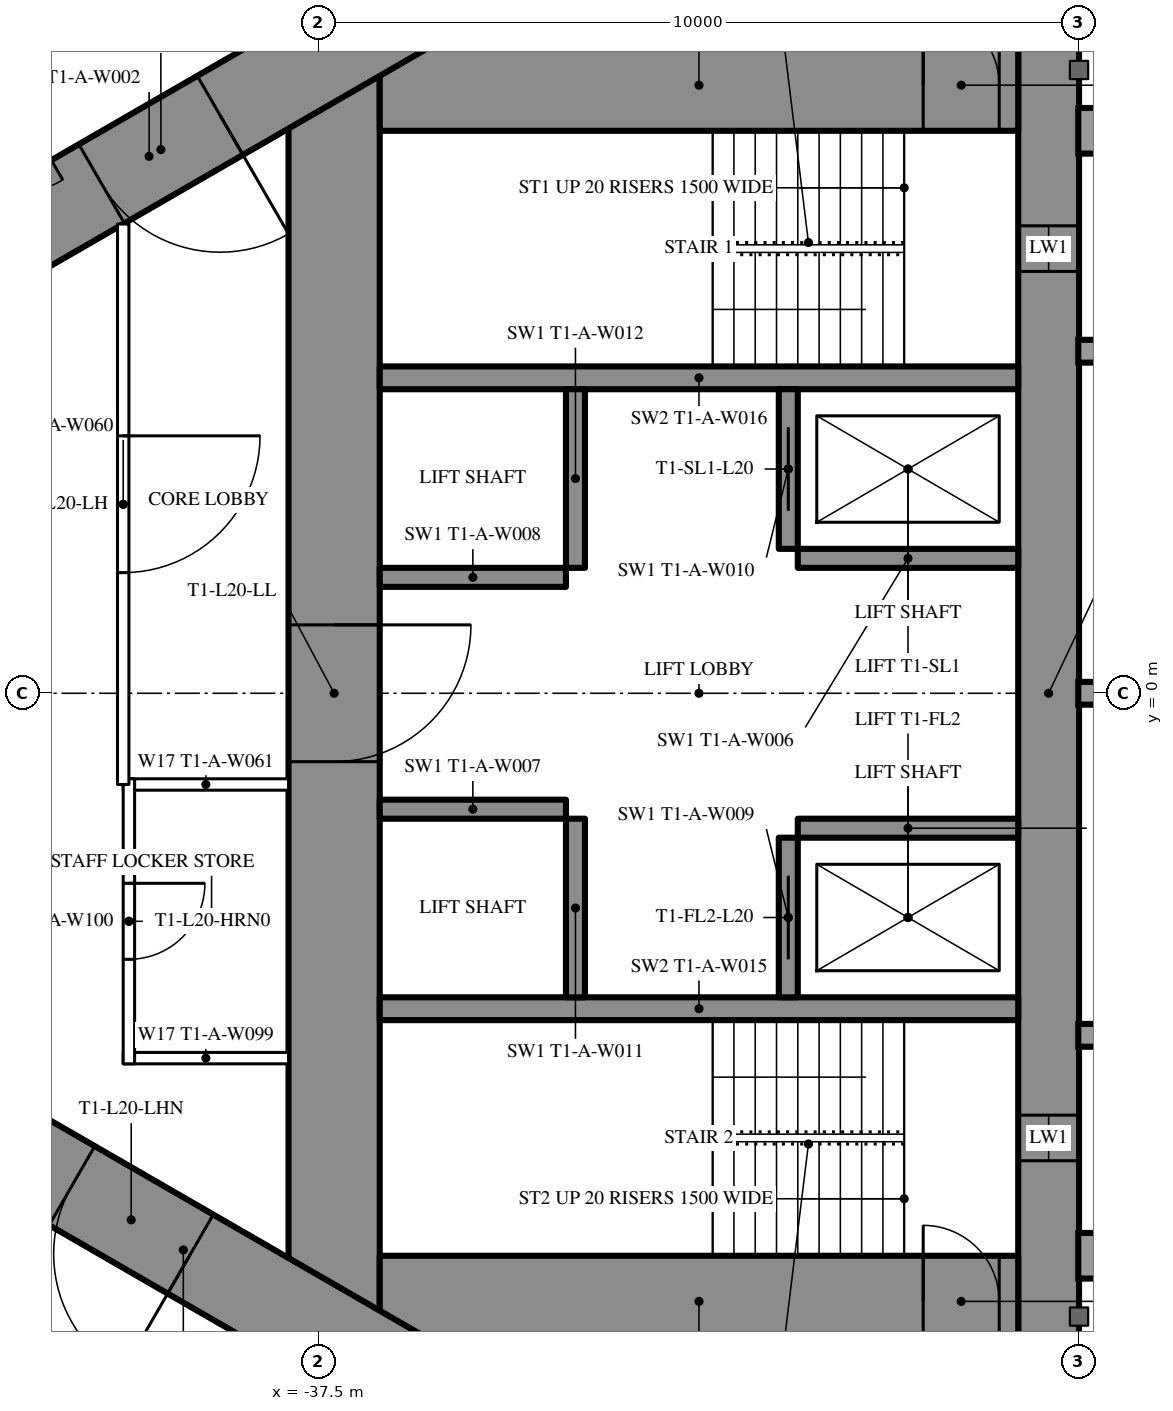
"""IFC4 building model, lengths in metres.
Left out: names, types, materials, properties, quantities, classifications, styles, units other than length and angle.
Written with IfcOpenShell. Run it as: python <this file> out.ifc"""

import sys

from ifc_helpers import new_model, si_unit, direction, frame, frame_2d, origin, place, context, subcontext, project, spatial, rectangle, extrude, element, fill, save


model = new_model("IFC4")
c1 = context("Model", 3, precision=1e-05, world=origin(), true_north=direction((0.0, 1.0)))
c2 = subcontext(c1, "Body", "Model", "MODEL_VIEW")
j1 = project(units=[si_unit("LENGTHUNIT", "METRE"), si_unit("PLANEANGLEUNIT", "RADIAN")], contexts=[c1])
p1 = place(None, origin())
s1 = spatial("IfcSite", under=j1, at=p1, CompositionType="ELEMENT")
p2 = place(p1, origin())
s2 = spatial("IfcBuilding", under=s1, at=p2, CompositionType="ELEMENT")
p3 = place(p2, frame((0.0, 0.0, 77.5)))
s3 = spatial("IfcBuildingStorey", under=s2, at=p3, CompositionType="ELEMENT", Elevation=77.5)
p4 = place(p3, frame((-27.9, 8.6, 0.0), z_axis=(0.0, 0.0, 1.0), x_axis=(0.0, -1.0, 0.0)))
e1 = element("IfcWall", 1, at=p4, inside=s3, PredefinedType="SHEAR", context=c2, shape_type="SweptSolid", body=[
    extrude(rectangle(XDim=17.2, YDim=0.8, at=frame_2d((8.6, 0.0))), origin(), (0.0, 0.0, 1.0), 3.5),
])
p5 = place(p4, frame((2.45, 0.0, 0.6)))
e2 = element("IfcOpeningElement", 2, at=p5, cuts=e1, PredefinedType="OPENING", context=c2, shape_type="SweptSolid", body=[
    extrude(rectangle(XDim=0.6, YDim=2.1, at=frame_2d((0.3, 1.05))), frame((0.0, 0.41, 0.0), z_axis=(0.0, -1.0, 0.0), x_axis=(1.0, 0.0, 0.0)), (0.0, 0.0, 1.0), 0.82),
])
p6 = place(p4, frame((14.15, 0.0, 0.6)))
e3 = element("IfcOpeningElement", 3, at=p6, cuts=e1, PredefinedType="OPENING", context=c2, shape_type="SweptSolid", body=[
    extrude(rectangle(XDim=0.6, YDim=2.1, at=frame_2d((0.3, 1.05))), frame((0.0, 0.41, 0.0), z_axis=(0.0, -1.0, 0.0), x_axis=(1.0, 0.0, 0.0)), (0.0, 0.0, 1.0), 0.82),
])
p7 = place(p3, frame((-37.3, 8.6, 0.0), z_axis=(0.0, 0.0, 1.0), x_axis=(0.0, -1.0, 0.0)))
e4 = element("IfcWall", 4, at=p7, inside=s3, PredefinedType="SHEAR", context=c2, shape_type="SweptSolid", body=[
    extrude(rectangle(XDim=17.2, YDim=1.2, at=frame_2d((8.6, 0.0))), origin(), (0.0, 0.0, 1.0), 3.5),
])
p8 = place(p7, frame((7.7, 0.0, 0.0)))
e5 = element("IfcOpeningElement", 5, at=p8, cuts=e4, PredefinedType="OPENING", context=c2, shape_type="SweptSolid", body=[
    extrude(rectangle(XDim=1.8, YDim=2.2, at=frame_2d((0.9, 1.1))), frame((0.0, 0.61, 0.0), z_axis=(0.0, -1.0, 0.0), x_axis=(1.0, 0.0, 0.0)), (0.0, 0.0, 1.0), 1.22),
])
p9 = place(p3, frame((-28.3, 8.0, 0.0), z_axis=(0.0, 0.0, 1.0), x_axis=(-1.0, 0.0, 0.0)))
e6 = element("IfcWall", 6, at=p9, inside=s3, PredefinedType="SHEAR", context=c2, shape_type="SweptSolid", body=[
    extrude(rectangle(XDim=8.4, YDim=1.2, at=frame_2d((4.2, 0.0))), origin(), (0.0, 0.0, 1.0), 3.5),
])
p10 = place(p9, frame((0.25, 0.0, 0.0)))
e7 = element("IfcOpeningElement", 7, at=p10, cuts=e6, PredefinedType="OPENING", context=c2, shape_type="SweptSolid", body=[
    extrude(rectangle(XDim=1.0, YDim=2.2, at=frame_2d((0.5, 1.1))), frame((0.0, 0.61, 0.0), z_axis=(0.0, -1.0, 0.0), x_axis=(1.0, 0.0, 0.0)), (0.0, 0.0, 1.0), 1.22),
])
p11 = place(p3, frame((-28.3, -8.0, 0.0), z_axis=(0.0, 0.0, 1.0), x_axis=(-1.0, 0.0, 0.0)))
e8 = element("IfcWall", 8, at=p11, inside=s3, PredefinedType="SHEAR", context=c2, shape_type="SweptSolid", body=[
    extrude(rectangle(XDim=8.4, YDim=1.2, at=frame_2d((4.2, 0.0))), origin(), (0.0, 0.0, 1.0), 3.5),
])
p12 = place(p11, frame((0.25, 0.0, 0.0)))
e9 = element("IfcOpeningElement", 9, at=p12, cuts=e8, PredefinedType="OPENING", context=c2, shape_type="SweptSolid", body=[
    extrude(rectangle(XDim=1.0, YDim=2.2, at=frame_2d((0.5, 1.1))), frame((0.0, 0.61, 0.0), z_axis=(0.0, -1.0, 0.0), x_axis=(1.0, 0.0, 0.0)), (0.0, 0.0, 1.0), 1.22),
])
for number, where, z_axis, x_axis in (
    (10, (-28.3, 4.15, 0.0), (0.0, 0.0, 1.0), (-1.0, 0.0, 0.0)),
    (11, (-28.3, -4.15, 0.0), (0.0, 0.0, 1.0), (-1.0, 0.0, 0.0)),
):
    element("IfcWall", number, at=place(p3, frame(where, z_axis=z_axis, x_axis=x_axis)), inside=s3, PredefinedType="SHEAR", context=c2, shape_type="SweptSolid", body=[
        extrude(rectangle(XDim=8.4, YDim=0.3, at=frame_2d((4.2, 0.0))), origin(), (0.0, 0.0, 1.0), 3.5),
    ])
p13 = place(p3, frame((-31.325, 4.0, 0.0), z_axis=(0.0, 0.0, 1.0), x_axis=(0.0, -1.0, 0.0)))
e12 = element("IfcWall", 12, at=p13, inside=s3, PredefinedType="SHEAR", context=c2, shape_type="SweptSolid", body=[
    extrude(rectangle(XDim=2.1, YDim=0.25, at=frame_2d((1.05, 0.0))), origin(), (0.0, 0.0, 1.0), 3.5),
])
p14 = place(p13, frame((0.5, 0.0, 0.0)))
e13 = element("IfcOpeningElement", 13, at=p14, cuts=e12, PredefinedType="OPENING", context=c2, shape_type="SweptSolid", body=[
    extrude(rectangle(XDim=1.1, YDim=2.2, at=frame_2d((0.55, 1.1))), frame((0.0, 0.135, 0.0), z_axis=(0.0, -1.0, 0.0), x_axis=(1.0, 0.0, 0.0)), (0.0, 0.0, 1.0), 0.27),
])
p15 = place(p3, frame((-34.125, 4.0, 0.0), z_axis=(0.0, 0.0, 1.0), x_axis=(0.0, -1.0, 0.0)))
e14 = element("IfcWall", 14, at=p15, inside=s3, PredefinedType="SHEAR", context=c2, shape_type="SweptSolid", body=[
    extrude(rectangle(XDim=2.35, YDim=0.25, at=frame_2d((1.175, 0.0))), origin(), (0.0, 0.0, 1.0), 3.5),
])
p16 = place(p3, frame((-28.3, 1.775, 0.0), z_axis=(0.0, 0.0, 1.0), x_axis=(-1.0, 0.0, 0.0)))
e15 = element("IfcWall", 15, at=p16, inside=s3, PredefinedType="SHEAR", context=c2, shape_type="SweptSolid", body=[
    extrude(rectangle(XDim=2.9, YDim=0.25, at=frame_2d((1.45, 0.0))), origin(), (0.0, 0.0, 1.0), 3.5),
])
p17 = place(p3, frame((-34.25, 1.525, 0.0), z_axis=(0.0, 0.0, 1.0), x_axis=(-1.0, 0.0, 0.0)))
e16 = element("IfcWall", 16, at=p17, inside=s3, PredefinedType="SHEAR", context=c2, shape_type="SweptSolid", body=[
    extrude(rectangle(XDim=2.45, YDim=0.25, at=frame_2d((1.225, 0.0))), origin(), (0.0, 0.0, 1.0), 3.5),
])
p18 = place(p3, frame((-31.325, -1.9, 0.0), z_axis=(0.0, 0.0, 1.0), x_axis=(0.0, -1.0, 0.0)))
e17 = element("IfcWall", 17, at=p18, inside=s3, PredefinedType="SHEAR", context=c2, shape_type="SweptSolid", body=[
    extrude(rectangle(XDim=2.1, YDim=0.25, at=frame_2d((1.05, 0.0))), origin(), (0.0, 0.0, 1.0), 3.5),
])
p19 = place(p18, frame((0.5, 0.0, 0.0)))
e18 = element("IfcOpeningElement", 18, at=p19, cuts=e17, PredefinedType="OPENING", context=c2, shape_type="SweptSolid", body=[
    extrude(rectangle(XDim=1.1, YDim=2.2, at=frame_2d((0.55, 1.1))), frame((0.0, 0.135, 0.0), z_axis=(0.0, -1.0, 0.0), x_axis=(1.0, 0.0, 0.0)), (0.0, 0.0, 1.0), 0.27),
])
p20 = place(p3, frame((-34.125, -1.65, 0.0), z_axis=(0.0, 0.0, 1.0), x_axis=(0.0, -1.0, 0.0)))
e19 = element("IfcWall", 19, at=p20, inside=s3, PredefinedType="SHEAR", context=c2, shape_type="SweptSolid", body=[
    extrude(rectangle(XDim=2.35, YDim=0.25, at=frame_2d((1.175, 0.0))), origin(), (0.0, 0.0, 1.0), 3.5),
])
p21 = place(p3, frame((-28.3, -1.775, 0.0), z_axis=(0.0, 0.0, 1.0), x_axis=(-1.0, 0.0, 0.0)))
e20 = element("IfcWall", 20, at=p21, inside=s3, PredefinedType="SHEAR", context=c2, shape_type="SweptSolid", body=[
    extrude(rectangle(XDim=2.9, YDim=0.25, at=frame_2d((1.45, 0.0))), origin(), (0.0, 0.0, 1.0), 3.5),
])
p22 = place(p3, frame((-34.25, -1.525, 0.0), z_axis=(0.0, 0.0, 1.0), x_axis=(-1.0, 0.0, 0.0)))
e21 = element("IfcWall", 21, at=p22, inside=s3, PredefinedType="SHEAR", context=c2, shape_type="SweptSolid", body=[
    extrude(rectangle(XDim=2.45, YDim=0.25, at=frame_2d((1.225, 0.0))), origin(), (0.0, 0.0, 1.0), 3.5),
])
p23 = place(p3, frame((-27.2, 14.3, 0.0), z_axis=(0.0, 0.0, 1.0), x_axis=(-0.866026593062, -0.499997940104, 0.0)))
e22 = element("IfcWall", 22, at=p23, inside=s3, PredefinedType="SHEAR", context=c2, shape_type="SweptSolid", body=[
    extrude(rectangle(XDim=28.946, YDim=1.2, at=frame_2d((14.473, 0.0))), origin(), (0.0, 0.0, 1.0), 3.5),
])
p24 = place(p23, frame((5.85, 0.0, 0.0)))
e23 = element("IfcOpeningElement", 23, at=p24, cuts=e22, PredefinedType="OPENING", context=c2, shape_type="SweptSolid", body=[
    extrude(rectangle(XDim=1.0, YDim=2.2, at=frame_2d((0.5, 1.1))), frame((0.0, 0.61, 0.0), z_axis=(0.0, -1.0, 0.0), x_axis=(1.0, 0.0, 0.0)), (0.0, 0.0, 1.0), 1.22),
])
p25 = place(p23, frame((13.395, 0.0, 0.0)))
e24 = element("IfcOpeningElement", 24, at=p25, cuts=e22, PredefinedType="OPENING", context=c2, shape_type="SweptSolid", body=[
    extrude(rectangle(XDim=1.8, YDim=2.04, at=frame_2d((0.9, 1.02))), frame((0.0, 0.61, 0.0), z_axis=(0.0, -1.0, 0.0), x_axis=(1.0, 0.0, 0.0)), (0.0, 0.0, 1.0), 1.22),
])
p26 = place(p3, frame((-27.2, -14.3, 0.0), z_axis=(0.0, 0.0, 1.0), x_axis=(-0.866024021859, 0.500002393557, 0.0)))
e25 = element("IfcWall", 25, at=p26, inside=s3, PredefinedType="SHEAR", context=c2, shape_type="SweptSolid", body=[
    extrude(rectangle(XDim=27.907, YDim=1.2, at=frame_2d((13.954, 0.0))), origin(), (0.0, 0.0, 1.0), 3.5),
])
p27 = place(p26, frame((4.6, 0.0, 0.0)))
e26 = element("IfcOpeningElement", 26, at=p27, cuts=e25, PredefinedType="OPENING", context=c2, shape_type="SweptSolid", body=[
    extrude(rectangle(XDim=1.0, YDim=2.2, at=frame_2d((0.5, 1.1))), frame((0.0, 0.61, 0.0), z_axis=(0.0, -1.0, 0.0), x_axis=(1.0, 0.0, 0.0)), (0.0, 0.0, 1.0), 1.22),
])
p28 = place(p26, frame((13.845, 0.0, 0.0)))
e27 = element("IfcOpeningElement", 27, at=p28, cuts=e25, PredefinedType="OPENING", context=c2, shape_type="SweptSolid", body=[
    extrude(rectangle(XDim=1.8, YDim=2.2, at=frame_2d((0.9, 1.1))), frame((0.0, 0.61, 0.0), z_axis=(0.0, -1.0, 0.0), x_axis=(1.0, 0.0, 0.0)), (0.0, 0.0, 1.0), 1.22),
])
p29 = place(p3, frame((-37.7, 10.894, 0.0), z_axis=(0.0, 0.0, 1.0), x_axis=(-0.866027905338, -0.499995667157, 0.0)))
e28 = element("IfcWall", 28, at=p29, inside=s3, PredefinedType="PARTITIONING", context=c2, shape_type="SweptSolid", body=[
    extrude(rectangle(XDim=21.787, YDim=0.2, at=frame_2d((10.894, 0.0))), origin(), (0.0, 0.0, 1.0), 3.25),
])
p30 = place(p29, frame((14.644, 0.0, 0.0)))
e29 = element("IfcOpeningElement", 29, at=p30, cuts=e28, PredefinedType="OPENING", context=c2, shape_type="SweptSolid", body=[
    extrude(rectangle(XDim=1.8, YDim=2.2, at=frame_2d((0.9, 1.1))), frame((0.0, 0.11, 0.0), z_axis=(0.0, -1.0, 0.0), x_axis=(1.0, 0.0, 0.0)), (0.0, 0.0, 1.0), 0.22),
])
p31 = place(p29, frame((19.958, 0.0, 0.0)))
e30 = element("IfcOpeningElement", 30, at=p31, cuts=e28, PredefinedType="OPENING", context=c2, shape_type="SweptSolid", body=[
    extrude(rectangle(XDim=1.329, YDim=2.04, at=frame_2d((0.665, 1.02))), frame((0.0, 0.11, 0.0), z_axis=(0.0, -1.0, 0.0), x_axis=(1.0, 0.0, 0.0)), (0.0, 0.0, 1.0), 0.22),
])
p32 = place(p29, frame((4.815, 0.0, 0.0)))
e31 = element("IfcOpeningElement", 31, at=p32, cuts=e28, PredefinedType="OPENING", context=c2, shape_type="SweptSolid", body=[
    extrude(rectangle(XDim=2.0, YDim=2.4, at=frame_2d((1.0, 1.2))), frame((0.0, 0.11, 0.0), z_axis=(0.0, -1.0, 0.0), x_axis=(1.0, 0.0, 0.0)), (0.0, 0.0, 1.0), 0.22),
])
p33 = place(p3, frame((-36.92, -11.344, 0.0), z_axis=(0.0, 0.0, 1.0), x_axis=(-0.866028313256, 0.499994960614, 0.0)))
e32 = element("IfcWall", 32, at=p33, inside=s3, PredefinedType="PARTITIONING", context=c2, shape_type="SweptSolid", body=[
    extrude(rectangle(XDim=22.568, YDim=0.2, at=frame_2d((11.284, 0.0))), origin(), (0.0, 0.0, 1.0), 3.25),
])
p34 = place(p33, frame((20.808, 0.0, 0.0)))
e33 = element("IfcOpeningElement", 33, at=p34, cuts=e32, PredefinedType="OPENING", context=c2, shape_type="SweptSolid", body=[
    extrude(rectangle(XDim=1.209, YDim=2.2, at=frame_2d((0.604, 1.1))), frame((0.0, 0.11, 0.0), z_axis=(0.0, -1.0, 0.0), x_axis=(1.0, 0.0, 0.0)), (0.0, 0.0, 1.0), 0.22),
])
p35 = place(p33, frame((15.544, 0.0, 0.0)))
e34 = element("IfcOpeningElement", 34, at=p35, cuts=e32, PredefinedType="OPENING", context=c2, shape_type="SweptSolid", body=[
    extrude(rectangle(XDim=1.8, YDim=2.2, at=frame_2d((0.9, 1.1))), frame((0.0, 0.11, 0.0), z_axis=(0.0, -1.0, 0.0), x_axis=(1.0, 0.0, 0.0)), (0.0, 0.0, 1.0), 0.22),
])
p36 = place(p33, frame((5.365, 0.0, 0.0)))
e35 = element("IfcOpeningElement", 35, at=p36, cuts=e32, PredefinedType="OPENING", context=c2, shape_type="SweptSolid", body=[
    extrude(rectangle(XDim=1.8, YDim=2.2, at=frame_2d((0.9, 1.1))), frame((0.0, 0.11, 0.0), z_axis=(0.0, -1.0, 0.0), x_axis=(1.0, 0.0, 0.0)), (0.0, 0.0, 1.0), 0.22),
])
for number, where, z_axis, x_axis in (
    (36, (-37.9, -1.2, 0.0), (0.0, 0.0, 1.0), (-1.0, 0.0, 0.0)),
    (37, (-37.9, -4.8, 0.0), (0.0, 0.0, 1.0), (-1.0, 0.0, 0.0)),
):
    element("IfcWall", number, at=place(p3, frame(where, z_axis=z_axis, x_axis=x_axis)), inside=s3, PredefinedType="PARTITIONING", context=c2, shape_type="SweptSolid", body=[
        extrude(rectangle(XDim=2.175, YDim=0.15, at=frame_2d((1.087, 0.0))), origin(), (0.0, 0.0, 1.0), 3.25),
    ])
p37 = place(p3, frame((-40.0, -1.125, 0.0), z_axis=(0.0, 0.0, 1.0), x_axis=(0.0, -1.0, 0.0)))
e38 = element("IfcWall", 38, at=p37, inside=s3, PredefinedType="PARTITIONING", context=c2, shape_type="SweptSolid", body=[
    extrude(rectangle(XDim=3.75, YDim=0.15, at=frame_2d((1.875, 0.0))), origin(), (0.0, 0.0, 1.0), 3.25),
])
p38 = place(p37, frame((1.375, 0.0, 0.0)))
e39 = element("IfcOpeningElement", 39, at=p38, cuts=e38, PredefinedType="OPENING", context=c2, shape_type="SweptSolid", body=[
    extrude(rectangle(XDim=1.0, YDim=2.2, at=frame_2d((0.5, 1.1))), frame((0.0, 0.085, 0.0), z_axis=(0.0, -1.0, 0.0), x_axis=(1.0, 0.0, 0.0)), (0.0, 0.0, 1.0), 0.17),
])
p39 = place(p3, frame((-40.075, 6.174, 0.0), z_axis=(0.0, 0.0, 1.0), x_axis=(0.0, -1.0, 0.0)))
e40 = element("IfcWall", 40, at=p39, inside=s3, PredefinedType="PARTITIONING", context=c2, shape_type="SweptSolid", body=[
    extrude(rectangle(XDim=7.374, YDim=0.15, at=frame_2d((3.687, 0.0))), origin(), (0.0, 0.0, 1.0), 3.25),
])
p40 = place(p39, frame((2.787, 0.0, 0.0)))
e41 = element("IfcOpeningElement", 41, at=p40, cuts=e40, PredefinedType="OPENING", context=c2, shape_type="SweptSolid", body=[
    extrude(rectangle(XDim=1.8, YDim=2.2, at=frame_2d((0.9, 1.1))), frame((0.0, 0.085, 0.0), z_axis=(0.0, -1.0, 0.0), x_axis=(1.0, 0.0, 0.0)), (0.0, 0.0, 1.0), 0.17),
])
p41 = place(p38, origin())
e42 = element("IfcDoor", 42, at=p41, inside=s3, OperationType="SINGLE_SWING_LEFT", PredefinedType="DOOR", context=c2, shape_type="SweptSolid", body=[
    extrude(rectangle(XDim=1.0, YDim=2.2, at=frame_2d((0.5, 1.1))), frame((0.0, 0.025, 0.0), z_axis=(0.0, -1.0, 0.0), x_axis=(1.0, 0.0, 0.0)), (0.0, 0.0, 1.0), 0.05),
])
fill(e39, e42)
p42 = place(p40, origin())
e43 = element("IfcDoor", 43, at=p42, inside=s3, OperationType="DOUBLE_DOOR_SINGLE_SWING", PredefinedType="DOOR", context=c2, shape_type="SweptSolid", body=[
    extrude(rectangle(XDim=1.8, YDim=2.2, at=frame_2d((0.9, 1.1))), frame((0.0, 0.025, 0.0), z_axis=(0.0, -1.0, 0.0), x_axis=(1.0, 0.0, 0.0)), (0.0, 0.0, 1.0), 0.05),
])
fill(e41, e43)
p43 = place(p25, origin())
e44 = element("IfcDoor", 44, at=p43, inside=s3, OperationType="DOUBLE_DOOR_SINGLE_SWING", PredefinedType="DOOR", context=c2, shape_type="SweptSolid", body=[
    extrude(rectangle(XDim=1.8, YDim=2.04, at=frame_2d((0.9, 1.02))), frame((0.0, 0.025, 0.0), z_axis=(0.0, -1.0, 0.0), x_axis=(1.0, 0.0, 0.0)), (0.0, 0.0, 1.0), 0.05),
])
fill(e24, e44)
p44 = place(p28, origin())
e45 = element("IfcDoor", 45, at=p44, inside=s3, OperationType="DOUBLE_DOOR_SINGLE_SWING", PredefinedType="DOOR", context=c2, shape_type="SweptSolid", body=[
    extrude(rectangle(XDim=1.8, YDim=2.2, at=frame_2d((0.9, 1.1))), frame((0.0, 0.025, 0.0), z_axis=(0.0, -1.0, 0.0), x_axis=(1.0, 0.0, 0.0)), (0.0, 0.0, 1.0), 0.05),
])
fill(e27, e45)
p45 = place(p8, origin())
e46 = element("IfcDoor", 46, at=p45, inside=s3, OperationType="DOUBLE_DOOR_SINGLE_SWING", PredefinedType="DOOR", context=c2, shape_type="SweptSolid", body=[
    extrude(rectangle(XDim=1.8, YDim=2.2, at=frame_2d((0.9, 1.1))), frame((0.0, 0.025, 0.0), z_axis=(0.0, -1.0, 0.0), x_axis=(1.0, 0.0, 0.0)), (0.0, 0.0, 1.0), 0.05),
])
fill(e5, e46)
p46 = place(p10, origin())
e47 = element("IfcDoor", 47, at=p46, inside=s3, OperationType="SINGLE_SWING_RIGHT", PredefinedType="DOOR", context=c2, shape_type="SweptSolid", body=[
    extrude(rectangle(XDim=1.0, YDim=2.2, at=frame_2d((0.5, 1.1))), frame((0.0, 0.025, 0.0), z_axis=(0.0, -1.0, 0.0), x_axis=(1.0, 0.0, 0.0)), (0.0, 0.0, 1.0), 0.05),
])
fill(e7, e47)
p47 = place(p12, origin())
e48 = element("IfcDoor", 48, at=p47, inside=s3, OperationType="SINGLE_SWING_RIGHT", PredefinedType="DOOR", context=c2, shape_type="SweptSolid", body=[
    extrude(rectangle(XDim=1.0, YDim=2.2, at=frame_2d((0.5, 1.1))), frame((0.0, 0.025, 0.0), z_axis=(0.0, -1.0, 0.0), x_axis=(1.0, 0.0, 0.0)), (0.0, 0.0, 1.0), 0.05),
])
fill(e9, e48)
p48 = place(p14, origin())
e49 = element("IfcDoor", 49, at=p48, inside=s3, OperationType="SLIDING_TO_LEFT", PredefinedType="USERDEFINED", context=c2, shape_type="SweptSolid", body=[
    extrude(rectangle(XDim=1.1, YDim=2.2, at=frame_2d((0.55, 1.1))), frame((0.0, 0.025, 0.0), z_axis=(0.0, -1.0, 0.0), x_axis=(1.0, 0.0, 0.0)), (0.0, 0.0, 1.0), 0.05),
])
fill(e13, e49)
p49 = place(p19, origin())
e50 = element("IfcDoor", 50, at=p49, inside=s3, OperationType="SLIDING_TO_LEFT", PredefinedType="USERDEFINED", context=c2, shape_type="SweptSolid", body=[
    extrude(rectangle(XDim=1.1, YDim=2.2, at=frame_2d((0.55, 1.1))), frame((0.0, 0.025, 0.0), z_axis=(0.0, -1.0, 0.0), x_axis=(1.0, 0.0, 0.0)), (0.0, 0.0, 1.0), 0.05),
])
fill(e18, e50)
p50 = place(p5, origin())
e51 = element("IfcWindow", 51, at=p50, inside=s3, PartitioningType="SINGLE_PANEL", PredefinedType="WINDOW", context=c2, shape_type="SweptSolid", body=[
    extrude(rectangle(XDim=0.6, YDim=2.1, at=frame_2d((0.3, 1.05))), frame((0.0, 0.03, 0.0), z_axis=(0.0, -1.0, 0.0), x_axis=(1.0, 0.0, 0.0)), (0.0, 0.0, 1.0), 0.06),
])
fill(e2, e51)
p51 = place(p6, origin())
e52 = element("IfcWindow", 52, at=p51, inside=s3, PartitioningType="SINGLE_PANEL", PredefinedType="WINDOW", context=c2, shape_type="SweptSolid", body=[
    extrude(rectangle(XDim=0.6, YDim=2.1, at=frame_2d((0.3, 1.05))), frame((0.0, 0.03, 0.0), z_axis=(0.0, -1.0, 0.0), x_axis=(1.0, 0.0, 0.0)), (0.0, 0.0, 1.0), 0.06),
])
fill(e3, e52)
save(model, sys.argv[1])
